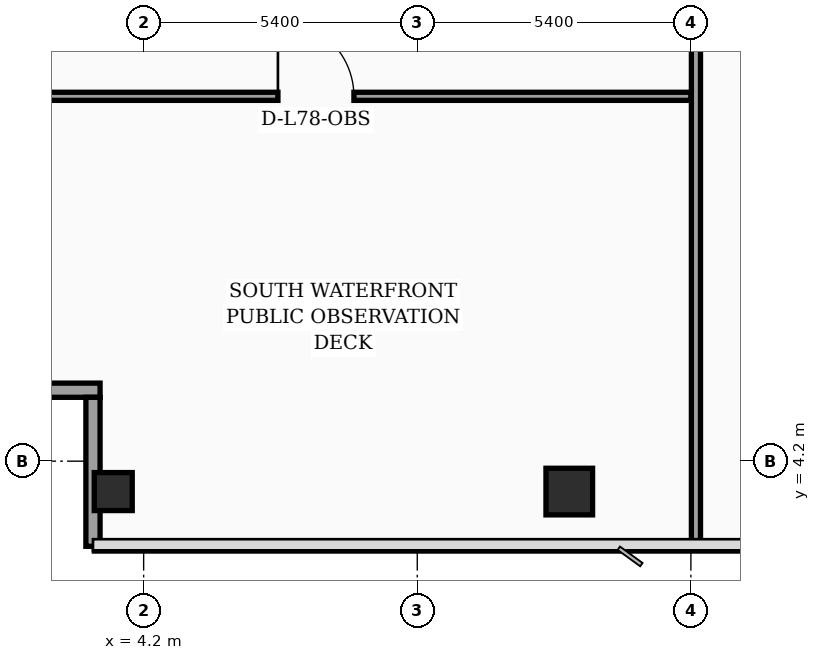
"""IFC4 building model, lengths in metres.
Left out: names, types, materials, properties, quantities, classifications, styles, units other than length and angle.
Written with IfcOpenShell. Run it as: python <this file> out.ifc"""

import sys

from ifc_helpers import new_model, si_unit, direction, frame, frame_2d, origin, origin_2d, place, context, subcontext, project, spatial, rectangle, hollow_rectangle, extrude, element, fill, save


model = new_model("IFC4")
c1 = context("Model", 3, precision=1e-05, world=origin(), true_north=direction((0.0, 1.0)))
c2 = subcontext(c1, "Body", "Model", "MODEL_VIEW")
j1 = project(units=[si_unit("LENGTHUNIT", "METRE"), si_unit("PLANEANGLEUNIT", "RADIAN")], contexts=[c1])
p1 = place(None, origin())
s1 = spatial("IfcSite", under=j1, at=p1, CompositionType="ELEMENT")
p2 = place(p1, origin())
s2 = spatial("IfcBuilding", under=s1, at=p2, CompositionType="ELEMENT")
p3 = place(p2, frame((0.0, 0.0, 316.0)))
s3 = spatial("IfcBuildingStorey", under=s2, at=p3, CompositionType="ELEMENT", Elevation=316.0)
p4 = place(p3, frame((3.6, 3.6, 0.0), z_axis=(0.0, 0.0, 1.0), x_axis=(1.0, 0.0, 0.0)))
e1 = element("IfcColumn", 1, at=p4, inside=s3, PredefinedType="COLUMN", context=c2, shape_type="SweptSolid", body=[
    extrude(hollow_rectangle(XDim=0.75, YDim=0.75, WallThickness=0.032, at=origin_2d()), origin(), (0.0, 0.0, 1.0), 4.26),
])
p5 = place(p3, frame((12.6, 3.6, 0.0), z_axis=(0.0, 0.0, 1.0), x_axis=(1.0, 0.0, 0.0)))
e2 = element("IfcColumn", 2, at=p5, inside=s3, PredefinedType="COLUMN", context=c2, shape_type="SweptSolid", body=[
    extrude(rectangle(XDim=0.92, YDim=0.92, at=origin_2d()), origin(), (0.0, 0.0, 1.0), 4.26),
])
p6 = place(p3, frame((0.12, 5.6, 0.0), z_axis=(0.0, 0.0, 1.0), x_axis=(1.0, 0.0, 0.0)))
e3 = element("IfcWall", 3, at=p6, inside=s3, PredefinedType="SOLIDWALL", context=c2, shape_type="SweptSolid", body=[
    extrude(rectangle(XDim=3.22, YDim=0.28, at=frame_2d((1.61, 0.0))), origin(), (0.0, 0.0, 1.0), 3.69),
])
p7 = place(p3, frame((3.2, 5.46, 0.0), z_axis=(0.0, 0.0, 1.0), x_axis=(0.0, -1.0, 0.0)))
e4 = element("IfcWall", 4, at=p7, inside=s3, PredefinedType="SOLIDWALL", context=c2, shape_type="SweptSolid", body=[
    extrude(rectangle(XDim=2.94, YDim=0.28, at=frame_2d((1.47, 0.0))), origin(), (0.0, 0.0, 1.0), 2.54),
])
p8 = place(p3, frame((0.35, 11.4, 0.0), z_axis=(0.0, 0.0, 1.0), x_axis=(1.0, 0.0, 0.0)))
e5 = element("IfcWall", 5, at=p8, inside=s3, PredefinedType="PARTITIONING", context=c2, shape_type="SweptSolid", body=[
    extrude(rectangle(XDim=14.65, YDim=0.16, at=frame_2d((7.325, 0.0))), origin(), (0.0, 0.0, 1.0), 3.69),
])
p9 = place(p8, frame((6.5, 0.0, 0.0)))
e6 = element("IfcOpeningElement", 6, at=p9, cuts=e5, PredefinedType="OPENING", context=c2, shape_type="SweptSolid", body=[
    extrude(rectangle(XDim=1.5, YDim=2.22, at=frame_2d((0.75, 1.11))), frame((0.0, 0.09, 0.0), z_axis=(0.0, -1.0, 0.0), x_axis=(1.0, 0.0, 0.0)), (0.0, 0.0, 1.0), 0.18),
])
p10 = place(p3, frame((15.1, 2.6, 0.0), z_axis=(0.0, 0.0, 1.0), x_axis=(0.0, 1.0, 0.0)))
e7 = element("IfcWall", 7, at=p10, inside=s3, PredefinedType="PARTITIONING", context=c2, shape_type="SweptSolid", body=[
    extrude(rectangle(XDim=14.0, YDim=0.18, at=frame_2d((7.0, 0.0))), origin(), (0.0, 0.0, 1.0), 2.54),
])
p11 = place(p10, frame((11.8, 0.0, 0.0)))
e8 = element("IfcOpeningElement", 8, at=p11, cuts=e7, PredefinedType="OPENING", context=c2, shape_type="SweptSolid", body=[
    extrude(rectangle(XDim=1.5, YDim=2.22, at=frame_2d((0.75, 1.11))), frame((0.0, 0.1, 0.0), z_axis=(0.0, -1.0, 0.0), x_axis=(1.0, 0.0, 0.0)), (0.0, 0.0, 1.0), 0.2),
])
p12 = place(p9, origin())
e9 = element("IfcDoor", 9, at=p12, inside=s3, OperationType="SINGLE_SWING_LEFT", PredefinedType="DOOR", context=c2, shape_type="SweptSolid", body=[
    extrude(rectangle(XDim=1.5, YDim=2.22, at=frame_2d((0.75, 1.11))), frame((0.0, 0.025, 0.0), z_axis=(0.0, -1.0, 0.0), x_axis=(1.0, 0.0, 0.0)), (0.0, 0.0, 1.0), 0.05),
])
fill(e6, e9)
save(model, sys.argv[1])
